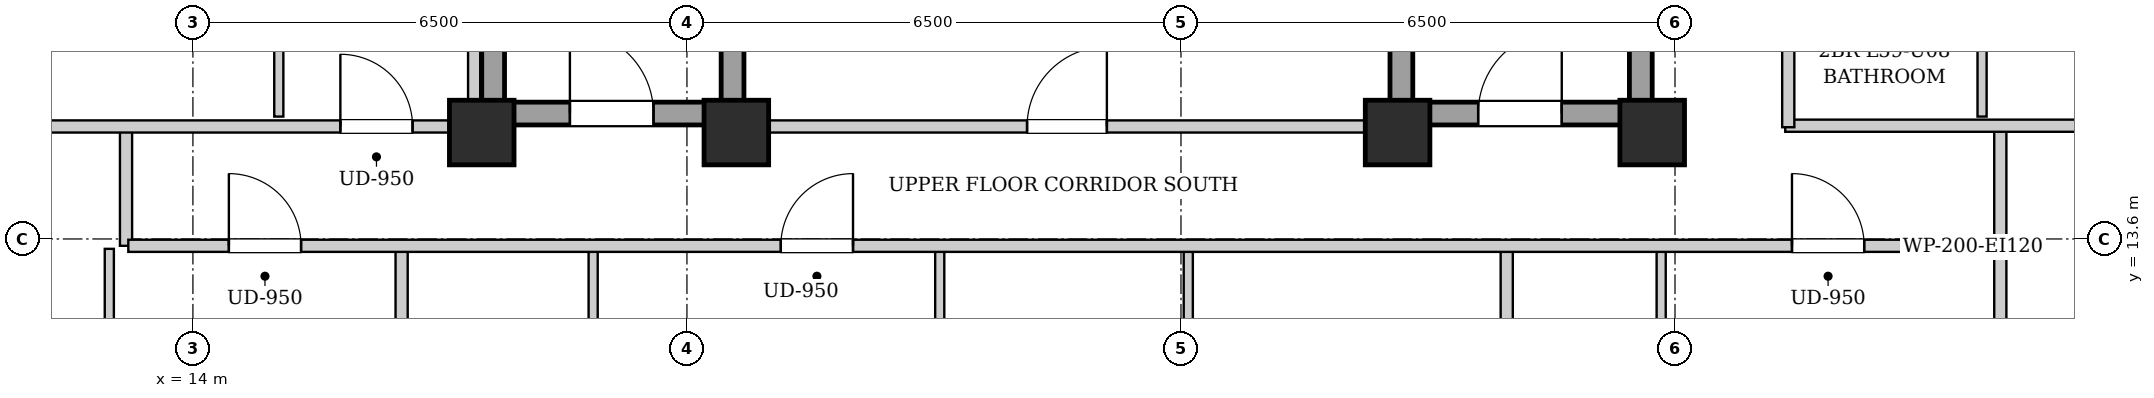
"""IFC4 building model, lengths in metres.
Left out: names, types, materials, properties, quantities, classifications, styles, units other than length and angle.
Written with IfcOpenShell. Run it as: python <this file> out.ifc"""

import sys

from ifc_helpers import new_model, si_unit, direction, frame, frame_2d, origin, origin_2d, place, context, subcontext, project, spatial, rectangle, extrude, element, fill, save


model = new_model("IFC4")
c1 = context("Model", 3, precision=1e-05, world=origin(), true_north=direction((0.0, 1.0)))
c2 = subcontext(c1, "Body", "Model", "MODEL_VIEW")
j1 = project(units=[si_unit("LENGTHUNIT", "METRE"), si_unit("PLANEANGLEUNIT", "RADIAN")], contexts=[c1])
p1 = place(None, origin())
s1 = spatial("IfcSite", under=j1, at=p1, CompositionType="ELEMENT")
p2 = place(p1, origin())
s2 = spatial("IfcBuilding", under=s1, at=p2, CompositionType="ELEMENT")
p3 = place(p2, frame((0.0, 0.0, 204.1)))
s3 = spatial("IfcBuildingStorey", under=s2, at=p3, CompositionType="ELEMENT", Elevation=204.1)
for number, where, z_axis, x_axis in (
    (1, (17.8, 15.0, 0.0), (0.0, 0.0, 1.0), (1.0, 0.0, 0.0)),
    (2, (21.15, 15.0, 0.0), (0.0, 0.0, 1.0), (1.0, 0.0, 0.0)),
    (3, (29.85, 15.0, 0.0), (0.0, 0.0, 1.0), (1.0, 0.0, 0.0)),
    (4, (33.2, 15.0, 0.0), (0.0, 0.0, 1.0), (1.0, 0.0, 0.0)),
):
    element("IfcColumn", number, at=place(p3, frame(where, z_axis=z_axis, x_axis=x_axis)), inside=s3, PredefinedType="COLUMN", context=c2, shape_type="SweptSolid", body=[
        extrude(rectangle(XDim=0.85, YDim=0.85, at=origin_2d()), origin(), (0.0, 0.0, 1.0), 3.3),
    ])
for number, where, z_axis, x_axis in (
    (5, (17.95, 15.1, 0.0), (0.0, 0.0, 1.0), (0.0, 1.0, 0.0)),
    (6, (21.1, 15.1, 0.0), (0.0, 0.0, 1.0), (0.0, 1.0, 0.0)),
):
    element("IfcWall", number, at=place(p3, frame(where, z_axis=z_axis, x_axis=x_axis)), inside=s3, PredefinedType="SHEAR", context=c2, shape_type="SweptSolid", body=[
        extrude(rectangle(XDim=9.0, YDim=0.3, at=frame_2d((4.5, 0.0))), origin(), (0.0, 0.0, 1.0), 3.04),
    ])
p4 = place(p3, frame((18.1, 15.25, 0.0), z_axis=(0.0, 0.0, 1.0), x_axis=(1.0, 0.0, 0.0)))
e7 = element("IfcWall", 7, at=p4, inside=s3, PredefinedType="SHEAR", context=c2, shape_type="SweptSolid", body=[
    extrude(rectangle(XDim=2.85, YDim=0.3, at=frame_2d((1.425, 0.0))), origin(), (0.0, 0.0, 1.0), 3.04),
])
p5 = place(p4, frame((0.86, 0.0, 0.0)))
e8 = element("IfcOpeningElement", 8, at=p5, cuts=e7, PredefinedType="OPENING", context=c2, shape_type="SweptSolid", body=[
    extrude(rectangle(XDim=1.1, YDim=2.05, at=frame_2d((0.55, 1.025))), frame((0.0, 0.16, 0.0), z_axis=(0.0, -1.0, 0.0), x_axis=(1.0, 0.0, 0.0)), (0.0, 0.0, 1.0), 0.32),
])
for number, where, z_axis, x_axis in (
    (9, (29.9, 15.1, 0.0), (0.0, 0.0, 1.0), (0.0, 1.0, 0.0)),
    (10, (33.05, 15.1, 0.0), (0.0, 0.0, 1.0), (0.0, 1.0, 0.0)),
):
    element("IfcWall", number, at=place(p3, frame(where, z_axis=z_axis, x_axis=x_axis)), inside=s3, PredefinedType="SHEAR", context=c2, shape_type="SweptSolid", body=[
        extrude(rectangle(XDim=9.0, YDim=0.3, at=frame_2d((4.5, 0.0))), origin(), (0.0, 0.0, 1.0), 3.04),
    ])
p6 = place(p3, frame((30.05, 15.25, 0.0), z_axis=(0.0, 0.0, 1.0), x_axis=(1.0, 0.0, 0.0)))
e11 = element("IfcWall", 11, at=p6, inside=s3, PredefinedType="SHEAR", context=c2, shape_type="SweptSolid", body=[
    extrude(rectangle(XDim=2.85, YDim=0.3, at=frame_2d((1.425, 0.0))), origin(), (0.0, 0.0, 1.0), 3.04),
])
p7 = place(p6, frame((0.86, 0.0, 0.0)))
e12 = element("IfcOpeningElement", 12, at=p7, cuts=e11, PredefinedType="OPENING", context=c2, shape_type="SweptSolid", body=[
    extrude(rectangle(XDim=1.1, YDim=2.05, at=frame_2d((0.55, 1.025))), frame((0.0, 0.16, 0.0), z_axis=(0.0, -1.0, 0.0), x_axis=(1.0, 0.0, 0.0)), (0.0, 0.0, 1.0), 0.32),
])
p8 = place(p3, frame((21.25, 15.08, 0.0), z_axis=(0.0, 0.0, 1.0), x_axis=(1.0, 0.0, 0.0)))
e13 = element("IfcWall", 13, at=p8, inside=s3, PredefinedType="PARTITIONING", context=c2, shape_type="SweptSolid", body=[
    extrude(rectangle(XDim=8.5, YDim=0.16, at=frame_2d((4.25, 0.0))), origin(), (0.0, 0.0, 1.0), 2.556),
])
p9 = place(p8, frame((3.725, 0.0, 0.0)))
e14 = element("IfcOpeningElement", 14, at=p9, cuts=e13, PredefinedType="OPENING", context=c2, shape_type="SweptSolid", body=[
    extrude(rectangle(XDim=1.05, YDim=2.05, at=frame_2d((0.525, 1.025))), frame((0.0, 0.09, 0.0), z_axis=(0.0, -1.0, 0.0), x_axis=(1.0, 0.0, 0.0)), (0.0, 0.0, 1.0), 0.18),
])
for number, where, z_axis, x_axis in (
    (15, (13.12, 13.51, 0.0), (0.0, 0.0, 1.0), (0.0, 1.0, 0.0)),
    (16, (37.78, 13.51, 0.0), (0.0, 0.0, 1.0), (0.0, 1.0, 0.0)),
):
    element("IfcWall", number, at=place(p3, frame(where, z_axis=z_axis, x_axis=x_axis)), inside=s3, PredefinedType="PARTITIONING", context=c2, shape_type="SweptSolid", body=[
        extrude(rectangle(XDim=1.58, YDim=0.16, at=frame_2d((0.79, 0.0))), origin(), (0.0, 0.0, 1.0), 3.04),
    ])
p10 = place(p3, frame((34.95, 15.09, 0.0), z_axis=(0.0, 0.0, 1.0), x_axis=(1.0, 0.0, 0.0)))
e17 = element("IfcWall", 17, at=p10, inside=s3, PredefinedType="PARTITIONING", context=c2, shape_type="SweptSolid", body=[
    extrude(rectangle(XDim=5.07, YDim=0.16, at=frame_2d((2.535, 0.0))), origin(), (0.0, 0.0, 1.0), 2.556),
])
p11 = place(p3, frame((12.9, 10.62, 0.0), z_axis=(0.0, 0.0, 1.0), x_axis=(0.0, 1.0, 0.0)))
e18 = element("IfcWall", 18, at=p11, inside=s3, PredefinedType="PARTITIONING", context=c2, shape_type="SweptSolid", body=[
    extrude(rectangle(XDim=2.85, YDim=0.12, at=frame_2d((1.425, 0.0))), origin(), (0.0, 0.0, 1.0), 3.04),
])
p12 = place(p11, frame((0.995, 0.0, 0.0)))
e19 = element("IfcOpeningElement", 19, at=p12, cuts=e18, PredefinedType="OPENING", context=c2, shape_type="SweptSolid", body=[
    extrude(rectangle(XDim=0.86, YDim=2.05, at=frame_2d((0.43, 1.025))), frame((0.0, 0.07, 0.0), z_axis=(0.0, -1.0, 0.0), x_axis=(1.0, 0.0, 0.0)), (0.0, 0.0, 1.0), 0.14),
])
p13 = place(p3, frame((16.746, 6.06, 0.0), z_axis=(0.0, 0.0, 1.0), x_axis=(0.0, 1.0, 0.0)))
e20 = element("IfcWall", 20, at=p13, inside=s3, PredefinedType="PARTITIONING", context=c2, shape_type="SweptSolid", body=[
    extrude(rectangle(XDim=7.41, YDim=0.16, at=frame_2d((3.705, 0.0))), origin(), (0.0, 0.0, 1.0), 3.04),
])
p14 = place(p3, frame((19.266, 10.62, 0.0), z_axis=(0.0, 0.0, 1.0), x_axis=(0.0, 1.0, 0.0)))
e21 = element("IfcWall", 21, at=p14, inside=s3, PredefinedType="PARTITIONING", context=c2, shape_type="SweptSolid", body=[
    extrude(rectangle(XDim=2.85, YDim=0.12, at=frame_2d((1.425, 0.0))), origin(), (0.0, 0.0, 1.0), 3.04),
])
p15 = place(p14, frame((0.995, 0.0, 0.0)))
e22 = element("IfcOpeningElement", 22, at=p15, cuts=e21, PredefinedType="OPENING", context=c2, shape_type="SweptSolid", body=[
    extrude(rectangle(XDim=0.86, YDim=2.05, at=frame_2d((0.43, 1.025))), frame((0.0, 0.07, 0.0), z_axis=(0.0, -1.0, 0.0), x_axis=(1.0, 0.0, 0.0)), (0.0, 0.0, 1.0), 0.14),
])
p16 = place(p3, frame((23.826, 10.62, 0.0), z_axis=(0.0, 0.0, 1.0), x_axis=(0.0, 1.0, 0.0)))
e23 = element("IfcWall", 23, at=p16, inside=s3, PredefinedType="PARTITIONING", context=c2, shape_type="SweptSolid", body=[
    extrude(rectangle(XDim=2.85, YDim=0.12, at=frame_2d((1.425, 0.0))), origin(), (0.0, 0.0, 1.0), 3.04),
])
p17 = place(p16, frame((0.975, 0.0, 0.0)))
e24 = element("IfcOpeningElement", 24, at=p17, cuts=e23, PredefinedType="OPENING", context=c2, shape_type="SweptSolid", body=[
    extrude(rectangle(XDim=0.9, YDim=2.05, at=frame_2d((0.45, 1.025))), frame((0.0, 0.07, 0.0), z_axis=(0.0, -1.0, 0.0), x_axis=(1.0, 0.0, 0.0)), (0.0, 0.0, 1.0), 0.14),
])
p18 = place(p3, frame((27.096, 10.62, 0.0), z_axis=(0.0, 0.0, 1.0), x_axis=(0.0, 1.0, 0.0)))
e25 = element("IfcWall", 25, at=p18, inside=s3, PredefinedType="PARTITIONING", context=c2, shape_type="SweptSolid", body=[
    extrude(rectangle(XDim=2.85, YDim=0.12, at=frame_2d((1.425, 0.0))), origin(), (0.0, 0.0, 1.0), 3.04),
])
p19 = place(p18, frame((0.975, 0.0, 0.0)))
e26 = element("IfcOpeningElement", 26, at=p19, cuts=e25, PredefinedType="OPENING", context=c2, shape_type="SweptSolid", body=[
    extrude(rectangle(XDim=0.9, YDim=2.05, at=frame_2d((0.45, 1.025))), frame((0.0, 0.07, 0.0), z_axis=(0.0, -1.0, 0.0), x_axis=(1.0, 0.0, 0.0)), (0.0, 0.0, 1.0), 0.14),
])
p20 = place(p3, frame((37.78, 10.56, 0.0), z_axis=(0.0, 0.0, 1.0), x_axis=(0.0, 1.0, 0.0)))
e27 = element("IfcWall", 27, at=p20, inside=s3, PredefinedType="PARTITIONING", context=c2, shape_type="SweptSolid", body=[
    extrude(rectangle(XDim=2.91, YDim=0.16, at=frame_2d((1.455, 0.0))), origin(), (0.0, 0.0, 1.0), 3.04),
])
p21 = place(p3, frame((31.286, 4.08, 0.0), z_axis=(0.0, 0.0, 1.0), x_axis=(0.0, 1.0, 0.0)))
e28 = element("IfcWall", 28, at=p21, inside=s3, PredefinedType="PARTITIONING", context=c2, shape_type="SweptSolid", body=[
    extrude(rectangle(XDim=9.39, YDim=0.16, at=frame_2d((4.695, 0.0))), origin(), (0.0, 0.0, 1.0), 3.04),
])
p22 = place(p3, frame((33.318, 10.62, 0.0), z_axis=(0.0, 0.0, 1.0), x_axis=(0.0, 1.0, 0.0)))
e29 = element("IfcWall", 29, at=p22, inside=s3, PredefinedType="PARTITIONING", context=c2, shape_type="SweptSolid", body=[
    extrude(rectangle(XDim=2.85, YDim=0.12, at=frame_2d((1.425, 0.0))), origin(), (0.0, 0.0, 1.0), 3.04),
])
p23 = place(p22, frame((0.995, 0.0, 0.0)))
e30 = element("IfcOpeningElement", 30, at=p23, cuts=e29, PredefinedType="OPENING", context=c2, shape_type="SweptSolid", body=[
    extrude(rectangle(XDim=0.86, YDim=2.05, at=frame_2d((0.43, 1.025))), frame((0.0, 0.07, 0.0), z_axis=(0.0, -1.0, 0.0), x_axis=(1.0, 0.0, 0.0)), (0.0, 0.0, 1.0), 0.14),
])
p24 = place(p3, frame((10.88, 15.08, 0.0), z_axis=(0.0, 0.0, 1.0), x_axis=(1.0, 0.0, 0.0)))
e31 = element("IfcWall", 31, at=p24, inside=s3, PredefinedType="PARTITIONING", context=c2, shape_type="SweptSolid", body=[
    extrude(rectangle(XDim=6.88, YDim=0.16, at=frame_2d((3.44, 0.0))), origin(), (0.0, 0.0, 1.0), 2.556),
])
p25 = place(p24, frame((5.06, 0.0, 0.0)))
e32 = element("IfcOpeningElement", 32, at=p25, cuts=e31, PredefinedType="OPENING", context=c2, shape_type="SweptSolid", body=[
    extrude(rectangle(XDim=0.95, YDim=2.1, at=frame_2d((0.475, 1.05))), frame((0.0, 0.09, 0.0), z_axis=(0.0, -1.0, 0.0), x_axis=(1.0, 0.0, 0.0)), (0.0, 0.0, 1.0), 0.18),
])
p26 = place(p3, frame((15.13, 15.21, 0.0), z_axis=(0.0, 0.0, 1.0), x_axis=(0.0, 1.0, 0.0)))
e33 = element("IfcWall", 33, at=p26, inside=s3, PredefinedType="PARTITIONING", context=c2, shape_type="SweptSolid", body=[
    extrude(rectangle(XDim=4.5, YDim=0.12, at=frame_2d((2.25, 0.0))), origin(), (0.0, 0.0, 1.0), 3.04),
])
p27 = place(p26, frame((1.8, 0.0, 0.0)))
e34 = element("IfcOpeningElement", 34, at=p27, cuts=e33, PredefinedType="OPENING", context=c2, shape_type="SweptSolid", body=[
    extrude(rectangle(XDim=0.9, YDim=2.05, at=frame_2d((0.45, 1.025))), frame((0.0, 0.07, 0.0), z_axis=(0.0, -1.0, 0.0), x_axis=(1.0, 0.0, 0.0)), (0.0, 0.0, 1.0), 0.14),
])
p28 = place(p3, frame((37.54, 15.21, 0.0), z_axis=(0.0, 0.0, 1.0), x_axis=(0.0, 1.0, 0.0)))
e35 = element("IfcWall", 35, at=p28, inside=s3, PredefinedType="PARTITIONING", context=c2, shape_type="SweptSolid", body=[
    extrude(rectangle(XDim=2.3, YDim=0.12, at=frame_2d((1.15, 0.0))), origin(), (0.0, 0.0, 1.0), 3.04),
])
p29 = place(p3, frame((13.15, 13.51, 0.0), z_axis=(0.0, 0.0, 1.0), x_axis=(1.0, 0.0, 0.0)))
e36 = element("IfcWall", 36, at=p29, inside=s3, PredefinedType="PARTITIONING", context=c2, shape_type="SweptSolid", body=[
    extrude(rectangle(XDim=24.6, YDim=0.16, at=frame_2d((12.3, 0.0))), origin(), (0.0, 0.0, 1.0), 3.04),
])
p30 = place(p29, frame((1.323, 0.0, 0.0)))
e37 = element("IfcOpeningElement", 37, at=p30, cuts=e36, PredefinedType="OPENING", context=c2, shape_type="SweptSolid", body=[
    extrude(rectangle(XDim=0.95, YDim=2.1, at=frame_2d((0.475, 1.05))), frame((0.0, 0.09, 0.0), z_axis=(0.0, -1.0, 0.0), x_axis=(1.0, 0.0, 0.0)), (0.0, 0.0, 1.0), 0.18),
])
p31 = place(p29, frame((8.585, 0.0, 0.0)))
e38 = element("IfcOpeningElement", 38, at=p31, cuts=e36, PredefinedType="OPENING", context=c2, shape_type="SweptSolid", body=[
    extrude(rectangle(XDim=0.95, YDim=2.1, at=frame_2d((0.475, 1.05))), frame((0.0, 0.09, 0.0), z_axis=(0.0, -1.0, 0.0), x_axis=(1.0, 0.0, 0.0)), (0.0, 0.0, 1.0), 0.18),
])
p32 = place(p29, frame((21.889, 0.0, 0.0)))
e39 = element("IfcOpeningElement", 39, at=p32, cuts=e36, PredefinedType="OPENING", context=c2, shape_type="SweptSolid", body=[
    extrude(rectangle(XDim=0.95, YDim=2.1, at=frame_2d((0.475, 1.05))), frame((0.0, 0.09, 0.0), z_axis=(0.0, -1.0, 0.0), x_axis=(1.0, 0.0, 0.0)), (0.0, 0.0, 1.0), 0.18),
])
p33 = place(p3, frame((17.7, 15.02, 0.0), z_axis=(0.0, 0.0, 1.0), x_axis=(0.0, 1.0, 0.0)))
e40 = element("IfcWall", 40, at=p33, inside=s3, PredefinedType="PARTITIONING", context=c2, shape_type="SweptSolid", body=[
    extrude(rectangle(XDim=13.98, YDim=0.16, at=frame_2d((6.99, 0.0))), origin(), (0.0, 0.0, 1.0), 3.04),
])
p34 = place(p3, frame((34.99, 15.07, 0.0), z_axis=(0.0, 0.0, 1.0), x_axis=(0.0, 1.0, 0.0)))
e41 = element("IfcWall", 41, at=p34, inside=s3, PredefinedType="PARTITIONING", context=c2, shape_type="SweptSolid", body=[
    extrude(rectangle(XDim=13.93, YDim=0.16, at=frame_2d((6.965, 0.0))), origin(), (0.0, 0.0, 1.0), 3.04),
])
p35 = place(p34, frame((4.385, 0.0, 0.0)))
e42 = element("IfcOpeningElement", 42, at=p35, cuts=e41, PredefinedType="OPENING", context=c2, shape_type="SweptSolid", body=[
    extrude(rectangle(XDim=0.95, YDim=2.1, at=frame_2d((0.475, 1.05))), frame((0.0, 0.09, 0.0), z_axis=(0.0, -1.0, 0.0), x_axis=(1.0, 0.0, 0.0)), (0.0, 0.0, 1.0), 0.18),
])
p36 = place(p5, origin())
e43 = element("IfcDoor", 43, at=p36, inside=s3, OperationType="SINGLE_SWING_LEFT", PredefinedType="DOOR", context=c2, shape_type="SweptSolid", body=[
    extrude(rectangle(XDim=1.1, YDim=2.05, at=frame_2d((0.55, 1.025))), frame((0.0, 0.025, 0.0), z_axis=(0.0, -1.0, 0.0), x_axis=(1.0, 0.0, 0.0)), (0.0, 0.0, 1.0), 0.05),
])
fill(e8, e43)
p37 = place(p7, origin())
e44 = element("IfcDoor", 44, at=p37, inside=s3, OperationType="SINGLE_SWING_RIGHT", PredefinedType="DOOR", context=c2, shape_type="SweptSolid", body=[
    extrude(rectangle(XDim=1.1, YDim=2.05, at=frame_2d((0.55, 1.025))), frame((0.0, 0.025, 0.0), z_axis=(0.0, -1.0, 0.0), x_axis=(1.0, 0.0, 0.0)), (0.0, 0.0, 1.0), 0.05),
])
fill(e12, e44)
p38 = place(p9, origin())
e45 = element("IfcDoor", 45, at=p38, inside=s3, OperationType="SINGLE_SWING_RIGHT", PredefinedType="DOOR", context=c2, shape_type="SweptSolid", body=[
    extrude(rectangle(XDim=1.05, YDim=2.05, at=frame_2d((0.525, 1.025))), frame((0.0, 0.025, 0.0), z_axis=(0.0, -1.0, 0.0), x_axis=(1.0, 0.0, 0.0)), (0.0, 0.0, 1.0), 0.05),
])
fill(e14, e45)
p39 = place(p25, origin())
e46 = element("IfcDoor", 46, at=p39, inside=s3, OperationType="SINGLE_SWING_LEFT", PredefinedType="DOOR", context=c2, shape_type="SweptSolid", body=[
    extrude(rectangle(XDim=0.95, YDim=2.1, at=frame_2d((0.475, 1.05))), frame((0.0, 0.025, 0.0), z_axis=(0.0, -1.0, 0.0), x_axis=(1.0, 0.0, 0.0)), (0.0, 0.0, 1.0), 0.05),
])
fill(e32, e46)
p40 = place(p30, origin())
e47 = element("IfcDoor", 47, at=p40, inside=s3, OperationType="SINGLE_SWING_LEFT", PredefinedType="DOOR", context=c2, shape_type="SweptSolid", body=[
    extrude(rectangle(XDim=0.95, YDim=2.1, at=frame_2d((0.475, 1.05))), frame((0.0, 0.025, 0.0), z_axis=(0.0, -1.0, 0.0), x_axis=(1.0, 0.0, 0.0)), (0.0, 0.0, 1.0), 0.05),
])
fill(e37, e47)
p41 = place(p31, origin())
e48 = element("IfcDoor", 48, at=p41, inside=s3, OperationType="SINGLE_SWING_RIGHT", PredefinedType="DOOR", context=c2, shape_type="SweptSolid", body=[
    extrude(rectangle(XDim=0.95, YDim=2.1, at=frame_2d((0.475, 1.05))), frame((0.0, 0.025, 0.0), z_axis=(0.0, -1.0, 0.0), x_axis=(1.0, 0.0, 0.0)), (0.0, 0.0, 1.0), 0.05),
])
fill(e38, e48)
p42 = place(p32, origin())
e49 = element("IfcDoor", 49, at=p42, inside=s3, OperationType="SINGLE_SWING_LEFT", PredefinedType="DOOR", context=c2, shape_type="SweptSolid", body=[
    extrude(rectangle(XDim=0.95, YDim=2.1, at=frame_2d((0.475, 1.05))), frame((0.0, 0.025, 0.0), z_axis=(0.0, -1.0, 0.0), x_axis=(1.0, 0.0, 0.0)), (0.0, 0.0, 1.0), 0.05),
])
fill(e39, e49)
save(model, sys.argv[1])
